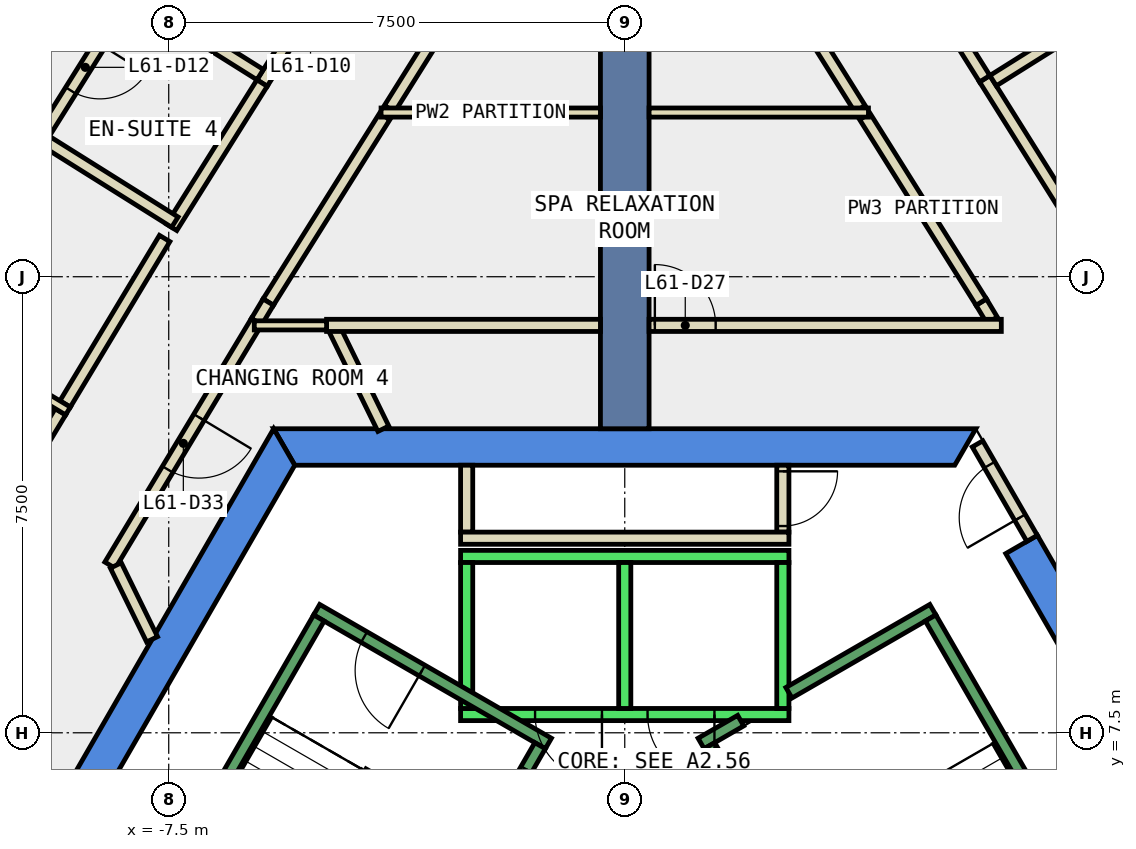
"""IFC4 building model, lengths in metres.
Left out: names, types, materials, properties, quantities, classifications, styles, units other than length and angle.
Written with IfcOpenShell. Run it as: python <this file> out.ifc"""

import sys

from ifc_helpers import new_model, si_unit, direction, frame, frame_2d, origin, place, context, subcontext, project, spatial, polyline, rectangle, outline, extrude, element, fill, save


model = new_model("IFC4")
c1 = context("Model", 3, precision=1e-05, world=origin(), true_north=direction((0.0, 1.0)))
c2 = subcontext(c1, "Body", "Model", "MODEL_VIEW")
j1 = project(units=[si_unit("LENGTHUNIT", "METRE"), si_unit("PLANEANGLEUNIT", "RADIAN")], contexts=[c1])
p1 = place(None, origin())
s1 = spatial("IfcSite", under=j1, at=p1, CompositionType="ELEMENT")
p2 = place(p1, origin())
s2 = spatial("IfcBuilding", under=s1, at=p2, CompositionType="ELEMENT")
p3 = place(p2, frame((0.0, 0.0, 266.6)))
s3 = spatial("IfcBuildingStorey", under=s2, at=p3, CompositionType="ELEMENT", Elevation=266.6)
p4 = place(p3, frame((0.0, 0.0, -0.34)))
e1 = element("IfcWall", 1, at=p4, inside=s3, PredefinedType="SHEAR", context=c2, shape_type="SweptSolid", body=[
    extrude(outline(polyline([(6.786, 10.747), (6.266, 10.447), (10.854, 2.5), (11.547, 2.5), (6.786, 10.747)])), origin(), (0.0, 0.0, 1.0), 3.6),
])
p5 = place(p3, frame((0.0, 0.0, -0.34)))
e2 = element("IfcWall", 2, at=p5, inside=s3, PredefinedType="SHEAR", context=c2, shape_type="SweptSolid", body=[
    extrude(outline(polyline([(5.774, 12.5), (-5.774, 12.5), (-5.427, 11.9), (5.427, 11.9), (5.774, 12.5)])), origin(), (0.0, 0.0, 1.0), 3.6),
])
p6 = place(p3, frame((0.0, 0.0, -0.34)))
e3 = element("IfcWall", 3, at=p6, inside=s3, PredefinedType="SHEAR", context=c2, shape_type="SweptSolid", body=[
    extrude(outline(polyline([(-10.535, 4.253), (-10.015, 3.953), (-5.427, 11.9), (-5.774, 12.5), (-10.535, 4.253)])), origin(), (0.0, 0.0, 1.0), 3.6),
])
p7 = place(p3, frame((0.0, 12.5, -0.34), z_axis=(0.0, 0.0, 1.0), x_axis=(0.0, 1.0, 0.0)))
e4 = element("IfcWall", 4, at=p7, inside=s3, PredefinedType="SHEAR", context=c2, shape_type="SweptSolid", body=[
    extrude(rectangle(XDim=9.0, YDim=0.8, at=frame_2d((4.5, 0.0))), origin(), (0.0, 0.0, 1.0), 3.6),
])
p8 = place(p3, frame((-3.97, 12.5, 0.0), z_axis=(0.0, 0.0, 1.0), x_axis=(-0.440355460167, 0.89782351757, 0.0)))
e5 = element("IfcWall", 5, at=p8, inside=s3, PredefinedType="PARTITIONING", context=c2, shape_type="SweptSolid", body=[
    extrude(rectangle(XDim=1.869, YDim=0.2, at=frame_2d((0.935, 0.0))), origin(), (0.0, 0.0, 1.0), 3.26),
])
p9 = place(p3, frame((-6.054, 14.264, 0.0), z_axis=(0.0, 0.0, 1.0), x_axis=(-0.515508653897, -0.856884372455, 0.0)))
e6 = element("IfcWall", 6, at=p9, inside=s3, PredefinedType="PARTITIONING", context=c2, shape_type="SweptSolid", body=[
    extrude(rectangle(XDim=4.677, YDim=0.2, at=frame_2d((2.339, 0.0))), origin(), (0.0, 0.0, 1.0), 3.26),
])
p10 = place(p9, frame((1.839, 0.0, 0.0)))
e7 = element("IfcOpeningElement", 7, at=p10, cuts=e6, PredefinedType="OPENING", context=c2, shape_type="SweptSolid", body=[
    extrude(rectangle(XDim=1.0, YDim=2.1, at=frame_2d((0.5, 1.05))), frame((0.0, 0.11, 0.0), z_axis=(0.0, -1.0, 0.0), x_axis=(1.0, 0.0, 0.0)), (0.0, 0.0, 1.0), 0.22),
])
p11 = place(p3, frame((-8.37, 10.252, 0.0), z_axis=(0.0, 0.0, 1.0), x_axis=(0.440562172885, -0.897722101668, 0.0)))
e8 = element("IfcWall", 8, at=p11, inside=s3, PredefinedType="PARTITIONING", context=c2, shape_type="SweptSolid", body=[
    extrude(rectangle(XDim=1.353, YDim=0.2, at=frame_2d((0.677, 0.0))), origin(), (0.0, 0.0, 1.0), 3.26),
])
p12 = place(p3, frame((-4.904, 14.2, 0.0), z_axis=(0.0, 0.0, 1.0), x_axis=(1.0, 0.0, 0.0)))
e9 = element("IfcWall", 9, at=p12, inside=s3, PredefinedType="PARTITIONING", context=c2, shape_type="SweptSolid", body=[
    extrude(rectangle(XDim=4.504, YDim=0.2, at=frame_2d((2.252, 0.0))), origin(), (0.0, 0.0, 1.0), 3.26),
])
p13 = place(p3, frame((6.041, 14.286, 0.0), z_axis=(0.0, 0.0, 1.0), x_axis=(-0.513873647624, 0.857865883619, 0.0)))
e10 = element("IfcWall", 10, at=p13, inside=s3, PredefinedType="PARTITIONING", context=c2, shape_type="SweptSolid", body=[
    extrude(rectangle(XDim=0.346, YDim=0.2, at=frame_2d((0.173, 0.0))), origin(), (0.0, 0.0, 1.0), 3.26),
])
for number, where, z_axis, x_axis in (
    (11, (5.863, 14.583, 0.0), (0.0, 0.0, 1.0), (-0.531, 0.847, 0.0)),
    (12, (-3.948, 17.636, 0.0), (0.0, 0.0, 1.0), (-0.531, -0.847, 0.0)),
):
    element("IfcWall", number, at=place(p3, frame(where, z_axis=z_axis, x_axis=x_axis)), inside=s3, PredefinedType="PARTITIONING", context=c2, shape_type="SweptSolid", body=[
        extrude(rectangle(XDim=3.604, YDim=0.2, at=frame_2d((1.802, 0.0))), origin(), (0.0, 0.0, 1.0), 3.26),
    ])
p14 = place(p3, frame((-5.863, 14.583, 0.0), z_axis=(0.0, 0.0, 1.0), x_axis=(-0.513433271491, -0.858129521533, 0.0)))
e13 = element("IfcWall", 13, at=p14, inside=s3, PredefinedType="PARTITIONING", context=c2, shape_type="SweptSolid", body=[
    extrude(rectangle(XDim=0.372, YDim=0.2, at=frame_2d((0.186, 0.0))), origin(), (0.0, 0.0, 1.0), 3.26),
])
for number, where, z_axis, x_axis in (
    (14, (3.868, 17.764, 0.0), (0.0, 0.0, 1.0), (-0.531, 0.847, 0.0)),
    (15, (-2.773, 19.511, 0.0), (0.0, 0.0, 1.0), (-0.531, -0.847, 0.0)),
):
    element("IfcWall", number, at=place(p3, frame(where, z_axis=z_axis, x_axis=x_axis)), inside=s3, PredefinedType="PARTITIONING", context=c2, shape_type="SweptSolid", body=[
        extrude(rectangle(XDim=2.062, YDim=0.2, at=frame_2d((1.031, 0.0))), origin(), (0.0, 0.0, 1.0), 3.26),
    ])
p15 = place(p3, frame((5.92, 18.256, 0.0), z_axis=(0.0, 0.0, 1.0), x_axis=(0.531152062518, -0.84727651123, 0.0)))
e16 = element("IfcWall", 16, at=p15, inside=s3, PredefinedType="PARTITIONING", context=c2, shape_type="SweptSolid", body=[
    extrude(rectangle(XDim=3.101, YDim=0.2, at=frame_2d((1.55, 0.0))), origin(), (0.0, 0.0, 1.0), 3.26),
])
p16 = place(p3, frame((4.433, 20.628, 0.0), z_axis=(0.0, 0.0, 1.0), x_axis=(0.531135189756, -0.84728708842, 0.0)))
e17 = element("IfcWall", 17, at=p16, inside=s3, PredefinedType="PARTITIONING", context=c2, shape_type="SweptSolid", body=[
    extrude(rectangle(XDim=2.799, YDim=0.2, at=frame_2d((1.4, 0.0))), origin(), (0.0, 0.0, 1.0), 3.26),
])
p17 = place(p3, frame((-5.965, 18.185, 0.0), z_axis=(0.0, 0.0, 1.0), x_axis=(0.531256372055, 0.847211111324, 0.0)))
e18 = element("IfcWall", 18, at=p17, inside=s3, PredefinedType="PARTITIONING", context=c2, shape_type="SweptSolid", body=[
    extrude(rectangle(XDim=3.0, YDim=0.2, at=frame_2d((1.5, 0.0))), origin(), (0.0, 0.0, 1.0), 3.26),
])
p18 = place(p17, frame((1.0, 0.0, 0.0)))
e19 = element("IfcOpeningElement", 19, at=p18, cuts=e18, PredefinedType="OPENING", context=c2, shape_type="SweptSolid", body=[
    extrude(rectangle(XDim=1.0, YDim=2.1, at=frame_2d((0.5, 1.05))), frame((0.0, 0.11, 0.0), z_axis=(0.0, -1.0, 0.0), x_axis=(1.0, 0.0, 0.0)), (0.0, 0.0, 1.0), 0.22),
])
p19 = place(p3, frame((-9.204, 12.908, 0.0), z_axis=(0.0, 0.0, 1.0), x_axis=(0.51556943596, 0.856847802532, 0.0)))
e20 = element("IfcWall", 20, at=p19, inside=s3, PredefinedType="PARTITIONING", context=c2, shape_type="SweptSolid", body=[
    extrude(rectangle(XDim=3.176, YDim=0.2, at=frame_2d((1.588, 0.0))), origin(), (0.0, 0.0, 1.0), 3.26),
])
p20 = place(p3, frame((-7.452, 15.813, 0.0), z_axis=(0.0, 0.0, 1.0), x_axis=(0.531095943551, 0.847311689252, 0.0)))
e21 = element("IfcWall", 21, at=p20, inside=s3, PredefinedType="PARTITIONING", context=c2, shape_type="SweptSolid", body=[
    extrude(rectangle(XDim=2.8, YDim=0.2, at=frame_2d((1.4, 0.0))), origin(), (0.0, 0.0, 1.0), 3.26),
])
p21 = place(p3, frame((-10.919, 10.057, 0.0), z_axis=(0.0, 0.0, 1.0), x_axis=(0.515568955032, 0.856848091908, 0.0)))
e22 = element("IfcWall", 22, at=p21, inside=s3, PredefinedType="PARTITIONING", context=c2, shape_type="SweptSolid", body=[
    extrude(rectangle(XDim=3.177, YDim=0.2, at=frame_2d((1.588, 0.0))), origin(), (0.0, 0.0, 1.0), 3.26),
])
p22 = place(p21, frame((1.088, 0.0, 0.0)))
e23 = element("IfcOpeningElement", 23, at=p22, cuts=e22, PredefinedType="OPENING", context=c2, shape_type="SweptSolid", body=[
    extrude(rectangle(XDim=1.0, YDim=2.1, at=frame_2d((0.5, 1.05))), frame((0.0, 0.11, 0.0), z_axis=(0.0, -1.0, 0.0), x_axis=(1.0, 0.0, 0.0)), (0.0, 0.0, 1.0), 0.22),
])
p23 = place(p3, frame((-2.6, 10.8, 0.0), z_axis=(0.0, 0.0, 1.0), x_axis=(0.0, 1.0, 0.0)))
e24 = element("IfcWall", 24, at=p23, inside=s3, PredefinedType="PARTITIONING", context=c2, shape_type="SweptSolid", body=[
    extrude(rectangle(XDim=1.1, YDim=0.2, at=frame_2d((0.55, 0.0))), origin(), (0.0, 0.0, 1.0), 3.26),
])
p24 = place(p3, frame((2.6, 11.9, 0.0), z_axis=(0.0, 0.0, 1.0), x_axis=(0.0, -1.0, 0.0)))
e25 = element("IfcWall", 25, at=p24, inside=s3, PredefinedType="PARTITIONING", context=c2, shape_type="SweptSolid", body=[
    extrude(rectangle(XDim=1.1, YDim=0.2, at=frame_2d((0.55, 0.0))), origin(), (0.0, 0.0, 1.0), 3.26),
])
p25 = place(p24, frame((0.1, 0.0, 0.0)))
e26 = element("IfcOpeningElement", 26, at=p25, cuts=e25, PredefinedType="OPENING", context=c2, shape_type="SweptSolid", body=[
    extrude(rectangle(XDim=0.9, YDim=2.1, at=frame_2d((0.45, 1.05))), frame((0.0, 0.11, 0.0), z_axis=(0.0, -1.0, 0.0), x_axis=(1.0, 0.0, 0.0)), (0.0, 0.0, 1.0), 0.22),
])
p26 = place(p3, frame((2.7, 10.7, 0.0), z_axis=(0.0, 0.0, 1.0), x_axis=(-1.0, 0.0, 0.0)))
e27 = element("IfcWall", 27, at=p26, inside=s3, PredefinedType="PARTITIONING", context=c2, shape_type="SweptSolid", body=[
    extrude(rectangle(XDim=5.4, YDim=0.2, at=frame_2d((2.7, 0.0))), origin(), (0.0, 0.0, 1.0), 3.26),
])
p27 = place(p3, frame((-4.904, 14.2, 0.0), z_axis=(0.0, 0.0, 1.0), x_axis=(-1.0, 0.0, 0.0)))
e28 = element("IfcWall", 28, at=p27, inside=s3, PredefinedType="PARTITIONING", context=c2, shape_type="SweptSolid", body=[
    extrude(rectangle(XDim=1.189, YDim=0.15, at=frame_2d((0.594, 0.0))), origin(), (0.0, 0.0, 1.0), 3.26),
])
p28 = place(p3, frame((-4.008, 17.7, 0.0), z_axis=(0.0, 0.0, 1.0), x_axis=(1.0, 0.0, 0.0)))
e29 = element("IfcWall", 29, at=p28, inside=s3, PredefinedType="PARTITIONING", context=c2, shape_type="SweptSolid", body=[
    extrude(rectangle(XDim=3.608, YDim=0.15, at=frame_2d((1.804, 0.0))), origin(), (0.0, 0.0, 1.0), 3.26),
])
for number, where, z_axis, x_axis in (
    (30, (6.058, 18.224, 0.0), (0.0, 0.0, 1.0), (0.847, 0.531, 0.0)),
    (31, (-5.996, 18.323, 0.0), (0.0, 0.0, 1.0), (-0.847, 0.531, 0.0)),
):
    element("IfcWall", number, at=place(p3, frame(where, z_axis=z_axis, x_axis=x_axis)), inside=s3, PredefinedType="PARTITIONING", context=c2, shape_type="SweptSolid", body=[
        extrude(rectangle(XDim=2.4, YDim=0.2, at=frame_2d((1.2, 0.0))), origin(), (0.0, 0.0, 1.0), 3.26),
    ])
p29 = place(p3, frame((-8.088, 19.693, 0.0), z_axis=(0.0, 0.0, 1.0), x_axis=(-0.531277961984, -0.847197572654, 0.0)))
e32 = element("IfcWall", 32, at=p29, inside=s3, PredefinedType="PARTITIONING", context=c2, shape_type="SweptSolid", body=[
    extrude(rectangle(XDim=2.95, YDim=0.2, at=frame_2d((1.475, 0.0))), origin(), (0.0, 0.0, 1.0), 3.26),
])
p30 = place(p29, frame((1.025, 0.0, 0.0)))
e33 = element("IfcOpeningElement", 33, at=p30, cuts=e32, PredefinedType="OPENING", context=c2, shape_type="SweptSolid", body=[
    extrude(rectangle(XDim=0.9, YDim=2.1, at=frame_2d((0.45, 1.05))), frame((0.0, 0.11, 0.0), z_axis=(0.0, -1.0, 0.0), x_axis=(1.0, 0.0, 0.0)), (0.0, 0.0, 1.0), 0.22),
])
p31 = place(p3, frame((-9.517, 17.226, 0.0), z_axis=(0.0, 0.0, 1.0), x_axis=(0.847229363594, -0.53122726348, 0.0)))
e34 = element("IfcWall", 34, at=p31, inside=s3, PredefinedType="PARTITIONING", context=c2, shape_type="SweptSolid", body=[
    extrude(rectangle(XDim=2.5, YDim=0.2, at=frame_2d((1.25, 0.0))), origin(), (0.0, 0.0, 1.0), 3.26),
])
p32 = place(p3, frame((-9.157, 12.792, 0.0), z_axis=(0.0, 0.0, 1.0), x_axis=(-0.856933793276, 0.515426497129, 0.0)))
e35 = element("IfcWall", 35, at=p32, inside=s3, PredefinedType="PARTITIONING", context=c2, shape_type="SweptSolid", body=[
    extrude(rectangle(XDim=5.9, YDim=0.15, at=frame_2d((2.95, 0.0))), origin(), (0.0, 0.0, 1.0), 3.26),
])
p33 = place(p3, frame((6.699, 10.697, 0.0), z_axis=(0.0, 0.0, 1.0), x_axis=(-0.499914839587, 0.866074565589, 0.0)))
e36 = element("IfcWall", 36, at=p33, inside=s3, PredefinedType="PARTITIONING", context=c2, shape_type="SweptSolid", body=[
    extrude(rectangle(XDim=1.794, YDim=0.2, at=frame_2d((0.897, 0.0))), origin(), (0.0, 0.0, 1.0), 2.4),
])
p34 = place(p33, frame((0.397, 0.0, 0.0)))
e37 = element("IfcOpeningElement", 37, at=p34, cuts=e36, PredefinedType="OPENING", context=c2, shape_type="SweptSolid", body=[
    extrude(rectangle(XDim=1.0, YDim=2.1, at=frame_2d((0.5, 1.05))), frame((0.0, 0.11, 0.0), z_axis=(0.0, -1.0, 0.0), x_axis=(1.0, 0.0, 0.0)), (0.0, 0.0, 1.0), 0.22),
])
p35 = place(p3, frame((0.4, 14.2, 0.0), z_axis=(0.0, 0.0, 1.0), x_axis=(1.0, 0.0, 0.0)))
e38 = element("IfcWall", 38, at=p35, inside=s3, PredefinedType="PARTITIONING", context=c2, shape_type="SweptSolid", body=[
    extrude(rectangle(XDim=5.793, YDim=0.2, at=frame_2d((2.896, 0.0))), origin(), (0.0, 0.0, 1.0), 3.26),
])
p36 = place(p35, frame((0.095, 0.0, 0.0)))
e39 = element("IfcOpeningElement", 39, at=p36, cuts=e38, PredefinedType="OPENING", context=c2, shape_type="SweptSolid", body=[
    extrude(rectangle(XDim=1.0, YDim=2.1, at=frame_2d((0.5, 1.05))), frame((0.0, 0.11, 0.0), z_axis=(0.0, -1.0, 0.0), x_axis=(1.0, 0.0, 0.0)), (0.0, 0.0, 1.0), 0.22),
])
p37 = place(p3, frame((0.4, 17.7, 0.0), z_axis=(0.0, 0.0, 1.0), x_axis=(1.0, 0.0, 0.0)))
e40 = element("IfcWall", 40, at=p37, inside=s3, PredefinedType="PARTITIONING", context=c2, shape_type="SweptSolid", body=[
    extrude(rectangle(XDim=3.608, YDim=0.15, at=frame_2d((1.804, 0.0))), origin(), (0.0, 0.0, 1.0), 3.26),
])
p38 = place(p3, frame((2.7, 7.8, 0.0), z_axis=(0.0, 0.0, 1.0), x_axis=(-1.0, 0.0, 0.0)))
e41 = element("IfcWall", 41, at=p38, inside=s3, PredefinedType="STANDARD", context=c2, shape_type="SweptSolid", body=[
    extrude(rectangle(XDim=5.4, YDim=0.2, at=frame_2d((2.7, 0.0))), origin(), (0.0, 0.0, 1.0), 3.26),
])
p39 = place(p38, frame((1.225, 0.0, 0.0)))
e42 = element("IfcOpeningElement", 42, at=p39, cuts=e41, PredefinedType="OPENING", context=c2, shape_type="SweptSolid", body=[
    extrude(rectangle(XDim=1.1, YDim=2.1, at=frame_2d((0.55, 1.05))), frame((0.0, 0.11, 0.0), z_axis=(0.0, -1.0, 0.0), x_axis=(1.0, 0.0, 0.0)), (0.0, 0.0, 1.0), 0.22),
])
p40 = place(p38, frame((3.075, 0.0, 0.0)))
e43 = element("IfcOpeningElement", 43, at=p40, cuts=e41, PredefinedType="OPENING", context=c2, shape_type="SweptSolid", body=[
    extrude(rectangle(XDim=1.1, YDim=2.1, at=frame_2d((0.55, 1.05))), frame((0.0, 0.11, 0.0), z_axis=(0.0, -1.0, 0.0), x_axis=(1.0, 0.0, 0.0)), (0.0, 0.0, 1.0), 0.22),
])
p41 = place(p3, frame((2.7, 10.4, 0.0), z_axis=(0.0, 0.0, 1.0), x_axis=(-1.0, 0.0, 0.0)))
e44 = element("IfcWall", 44, at=p41, inside=s3, PredefinedType="STANDARD", context=c2, shape_type="SweptSolid", body=[
    extrude(rectangle(XDim=5.4, YDim=0.2, at=frame_2d((2.7, 0.0))), origin(), (0.0, 0.0, 1.0), 3.26),
])
for number, where, z_axis, x_axis in (
    (45, (2.6, 7.9, 0.0), (0.0, 0.0, 1.0), (0.0, 1.0, 0.0)),
    (46, (0.0, 7.9, 0.0), (0.0, 0.0, 1.0), (0.0, 1.0, 0.0)),
    (47, (-2.6, 7.9, 0.0), (0.0, 0.0, 1.0), (0.0, 1.0, 0.0)),
):
    element("IfcWall", number, at=place(p3, frame(where, z_axis=z_axis, x_axis=x_axis)), inside=s3, PredefinedType="STANDARD", context=c2, shape_type="SweptSolid", body=[
        extrude(rectangle(XDim=2.4, YDim=0.2, at=frame_2d((1.2, 0.0))), origin(), (0.0, 0.0, 1.0), 3.26),
    ])
p42 = place(p3, frame((2.7, 8.158, 0.0), z_axis=(0.0, 0.0, 1.0), x_axis=(0.86611865017, 0.499838457731, 0.0)))
e48 = element("IfcWall", 48, at=p42, inside=s3, PredefinedType="STANDARD", context=c2, shape_type="SweptSolid", body=[
    extrude(rectangle(XDim=2.733, YDim=0.2, at=frame_2d((1.366, 0.0))), origin(), (0.0, 0.0, 1.0), 3.26),
])
p43 = place(p3, frame((1.256, 7.324, 0.0), z_axis=(0.0, 0.0, 1.0), x_axis=(0.865915093549, 0.500191014278, 0.0)))
e49 = element("IfcWall", 49, at=p43, inside=s3, PredefinedType="STANDARD", context=c2, shape_type="SweptSolid", body=[
    extrude(rectangle(XDim=0.752, YDim=0.2, at=frame_2d((0.376, 0.0))), origin(), (0.0, 0.0, 1.0), 3.26),
])
p44 = place(p3, frame((4.843, 1.312, 0.0), z_axis=(0.0, 0.0, 1.0), x_axis=(-0.499963383562, 0.866046543262, 0.0)))
e50 = element("IfcWall", 50, at=p44, inside=s3, PredefinedType="STANDARD", context=c2, shape_type="SweptSolid", body=[
    extrude(rectangle(XDim=6.9, YDim=0.2, at=frame_2d((3.45, 0.0))), origin(), (0.0, 0.0, 1.0), 3.26),
])
p45 = place(p44, frame((0.45, 0.0, 0.0)))
e51 = element("IfcOpeningElement", 51, at=p45, cuts=e50, PredefinedType="OPENING", context=c2, shape_type="SweptSolid", body=[
    extrude(rectangle(XDim=1.1, YDim=2.2, at=frame_2d((0.55, 1.1))), frame((0.0, 0.11, 0.0), z_axis=(0.0, -1.0, 0.0), x_axis=(1.0, 0.0, 0.0)), (0.0, 0.0, 1.0), 0.22),
])
p46 = place(p3, frame((8.48, 3.412, 0.0), z_axis=(0.0, 0.0, 1.0), x_axis=(-0.499978703459, 0.866037698999, 0.0)))
e52 = element("IfcWall", 52, at=p46, inside=s3, PredefinedType="STANDARD", context=c2, shape_type="SweptSolid", body=[
    extrude(rectangle(XDim=6.9, YDim=0.2, at=frame_2d((3.45, 0.0))), origin(), (0.0, 0.0, 1.0), 3.26),
])
p47 = place(p3, frame((-1.256, 7.324, 0.0), z_axis=(0.0, 0.0, 1.0), x_axis=(-0.866046073146, 0.499964197906, 0.0)))
e53 = element("IfcWall", 53, at=p47, inside=s3, PredefinedType="STANDARD", context=c2, shape_type="SweptSolid", body=[
    extrude(rectangle(XDim=4.4, YDim=0.2, at=frame_2d((2.2, 0.0))), origin(), (0.0, 0.0, 1.0), 3.26),
])
p48 = place(p47, frame((2.4, 0.0, 0.0)))
e54 = element("IfcOpeningElement", 54, at=p48, cuts=e53, PredefinedType="OPENING", context=c2, shape_type="SweptSolid", body=[
    extrude(rectangle(XDim=1.1, YDim=2.2, at=frame_2d((0.55, 1.1))), frame((0.0, 0.11, 0.0), z_axis=(0.0, -1.0, 0.0), x_axis=(1.0, 0.0, 0.0)), (0.0, 0.0, 1.0), 0.22),
])
p49 = place(p3, frame((-1.393, 7.288, 0.0), z_axis=(0.0, 0.0, 1.0), x_axis=(-0.499963383562, -0.866046543262, 0.0)))
e55 = element("IfcWall", 55, at=p49, inside=s3, PredefinedType="STANDARD", context=c2, shape_type="SweptSolid", body=[
    extrude(rectangle(XDim=6.9, YDim=0.2, at=frame_2d((3.45, 0.0))), origin(), (0.0, 0.0, 1.0), 3.26),
])
p50 = place(p49, frame((0.45, 0.0, 0.0)))
e56 = element("IfcOpeningElement", 56, at=p50, cuts=e55, PredefinedType="OPENING", context=c2, shape_type="SweptSolid", body=[
    extrude(rectangle(XDim=1.1, YDim=2.2, at=frame_2d((0.55, 1.1))), frame((0.0, 0.11, 0.0), z_axis=(0.0, -1.0, 0.0), x_axis=(1.0, 0.0, 0.0)), (0.0, 0.0, 1.0), 0.22),
])
p51 = place(p3, frame((-5.03, 9.388, 0.0), z_axis=(0.0, 0.0, 1.0), x_axis=(-0.499978703459, -0.866037698999, 0.0)))
e57 = element("IfcWall", 57, at=p51, inside=s3, PredefinedType="STANDARD", context=c2, shape_type="SweptSolid", body=[
    extrude(rectangle(XDim=6.9, YDim=0.2, at=frame_2d((3.45, 0.0))), origin(), (0.0, 0.0, 1.0), 3.26),
])
p52 = place(p30, origin())
e58 = element("IfcDoor", 58, at=p52, inside=s3, OperationType="SINGLE_SWING_LEFT", PredefinedType="DOOR", context=c2, shape_type="SweptSolid", body=[
    extrude(rectangle(XDim=0.9, YDim=2.1, at=frame_2d((0.45, 1.05))), frame((0.0, 0.025, 0.0), z_axis=(0.0, -1.0, 0.0), x_axis=(1.0, 0.0, 0.0)), (0.0, 0.0, 1.0), 0.05),
])
fill(e33, e58)
p53 = place(p36, origin())
e59 = element("IfcDoor", 59, at=p53, inside=s3, OperationType="SINGLE_SWING_LEFT", PredefinedType="DOOR", context=c2, shape_type="SweptSolid", body=[
    extrude(rectangle(XDim=1.0, YDim=2.1, at=frame_2d((0.5, 1.05))), frame((0.0, 0.025, 0.0), z_axis=(0.0, -1.0, 0.0), x_axis=(1.0, 0.0, 0.0)), (0.0, 0.0, 1.0), 0.05),
])
fill(e39, e59)
p54 = place(p10, origin())
e60 = element("IfcDoor", 60, at=p54, inside=s3, OperationType="SINGLE_SWING_LEFT", PredefinedType="DOOR", context=c2, shape_type="SweptSolid", body=[
    extrude(rectangle(XDim=1.0, YDim=2.1, at=frame_2d((0.5, 1.05))), frame((0.0, 0.025, 0.0), z_axis=(0.0, -1.0, 0.0), x_axis=(1.0, 0.0, 0.0)), (0.0, 0.0, 1.0), 0.05),
])
fill(e7, e60)
p55 = place(p25, origin())
e61 = element("IfcDoor", 61, at=p55, inside=s3, OperationType="SINGLE_SWING_LEFT", PredefinedType="DOOR", context=c2, shape_type="SweptSolid", body=[
    extrude(rectangle(XDim=0.9, YDim=2.1, at=frame_2d((0.45, 1.05))), frame((0.0, 0.025, 0.0), z_axis=(0.0, -1.0, 0.0), x_axis=(1.0, 0.0, 0.0)), (0.0, 0.0, 1.0), 0.05),
])
fill(e26, e61)
p56 = place(p34, origin())
e62 = element("IfcDoor", 62, at=p56, inside=s3, OperationType="SINGLE_SWING_LEFT", PredefinedType="DOOR", context=c2, shape_type="SweptSolid", body=[
    extrude(rectangle(XDim=1.0, YDim=2.1, at=frame_2d((0.5, 1.05))), frame((0.0, 0.025, 0.0), z_axis=(0.0, -1.0, 0.0), x_axis=(1.0, 0.0, 0.0)), (0.0, 0.0, 1.0), 0.05),
])
fill(e37, e62)
p57 = place(p39, origin())
e63 = element("IfcDoor", 63, at=p57, inside=s3, OperationType="SLIDING_TO_LEFT", PredefinedType="DOOR", context=c2, shape_type="SweptSolid", body=[
    extrude(rectangle(XDim=1.1, YDim=2.1, at=frame_2d((0.55, 1.05))), frame((0.0, 0.025, 0.0), z_axis=(0.0, -1.0, 0.0), x_axis=(1.0, 0.0, 0.0)), (0.0, 0.0, 1.0), 0.05),
])
fill(e42, e63)
p58 = place(p40, origin())
e64 = element("IfcDoor", 64, at=p58, inside=s3, OperationType="SLIDING_TO_LEFT", PredefinedType="DOOR", context=c2, shape_type="SweptSolid", body=[
    extrude(rectangle(XDim=1.1, YDim=2.1, at=frame_2d((0.55, 1.05))), frame((0.0, 0.025, 0.0), z_axis=(0.0, -1.0, 0.0), x_axis=(1.0, 0.0, 0.0)), (0.0, 0.0, 1.0), 0.05),
])
fill(e43, e64)
p59 = place(p50, origin())
e65 = element("IfcDoor", 65, at=p59, inside=s3, OperationType="SINGLE_SWING_LEFT", PredefinedType="DOOR", context=c2, shape_type="SweptSolid", body=[
    extrude(rectangle(XDim=1.1, YDim=2.2, at=frame_2d((0.55, 1.1))), frame((0.0, 0.025, 0.0), z_axis=(0.0, -1.0, 0.0), x_axis=(1.0, 0.0, 0.0)), (0.0, 0.0, 1.0), 0.05),
])
fill(e56, e65)
p60 = place(p48, origin())
e66 = element("IfcDoor", 66, at=p60, inside=s3, OperationType="SINGLE_SWING_LEFT", PredefinedType="DOOR", context=c2, shape_type="SweptSolid", body=[
    extrude(rectangle(XDim=1.1, YDim=2.2, at=frame_2d((0.55, 1.1))), frame((0.0, 0.025, 0.0), z_axis=(0.0, -1.0, 0.0), x_axis=(1.0, 0.0, 0.0)), (0.0, 0.0, 1.0), 0.05),
])
fill(e54, e66)
save(model, sys.argv[1])
